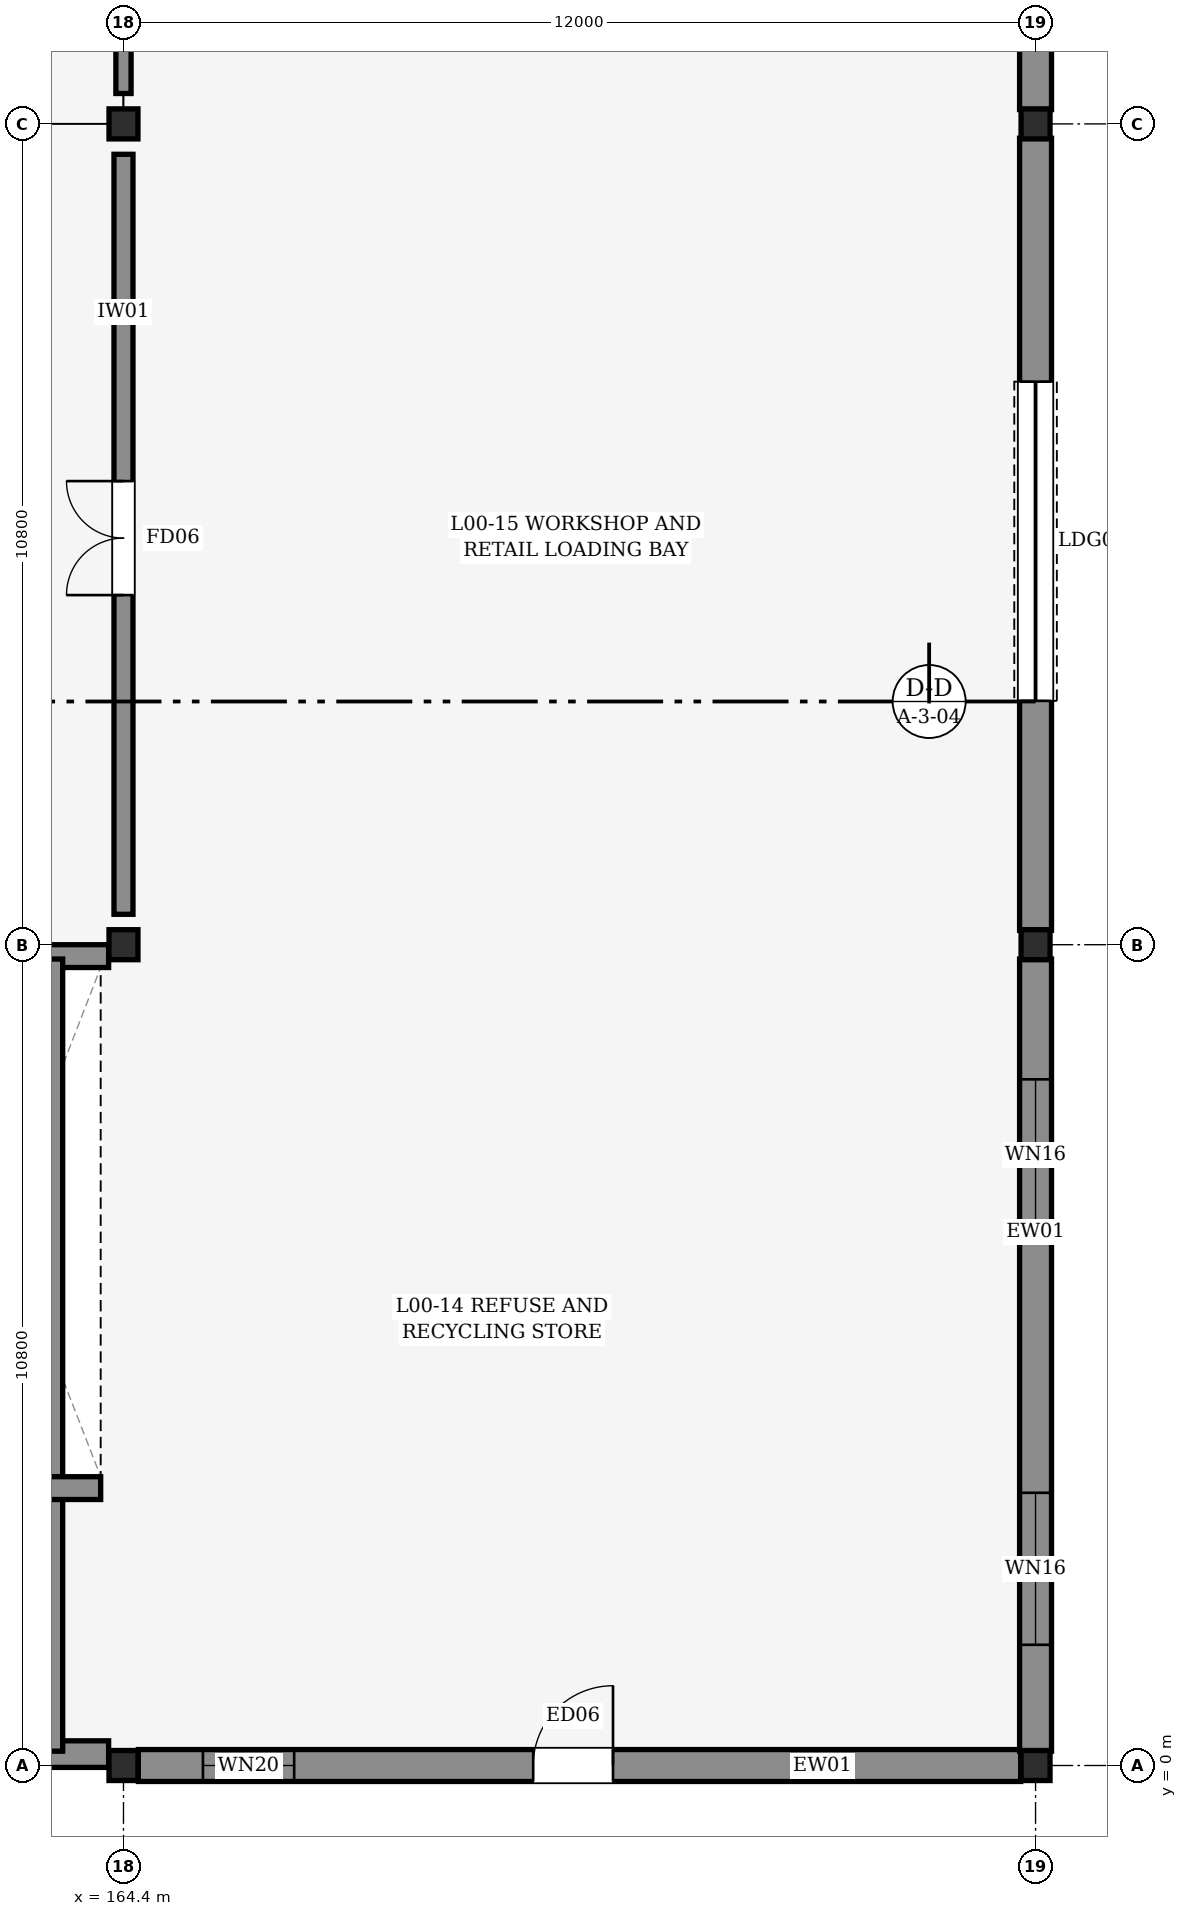
"""IFC4 building model, lengths in metres.
Left out: names, types, materials, properties, quantities, classifications, styles, units other than length and angle.
Written with IfcOpenShell. Run it as: python <this file> out.ifc"""

import sys

from ifc_helpers import new_model, si_unit, direction, frame, frame_2d, origin, origin_2d, place, context, subcontext, project, spatial, rectangle, i_section, extrude, element, fill, save


model = new_model("IFC4")
c1 = context("Model", 3, precision=1e-05, world=origin(), true_north=direction((0.0, 1.0)))
c2 = subcontext(c1, "Body", "Model", "MODEL_VIEW")
j1 = project(units=[si_unit("LENGTHUNIT", "METRE"), si_unit("PLANEANGLEUNIT", "RADIAN")], contexts=[c1])
p1 = place(None, origin())
s1 = spatial("IfcSite", under=j1, at=p1, CompositionType="ELEMENT")
p2 = place(p1, origin())
s2 = spatial("IfcBuilding", under=s1, at=p2, CompositionType="ELEMENT")
p3 = place(p2, origin())
s3 = spatial("IfcBuildingStorey", under=s2, at=p3, CompositionType="ELEMENT", Elevation=0.0)
for number, where, z_axis, x_axis in (
    (1, (164.4, 0.0, 0.0), (0.0, 0.0, 1.0), (1.0, 0.0, 0.0)),
    (2, (164.4, 10.8, 0.0), (0.0, 0.0, 1.0), (1.0, 0.0, 0.0)),
    (3, (164.4, 21.6, 0.0), (0.0, 0.0, 1.0), (1.0, 0.0, 0.0)),
    (4, (176.4, 0.0, 0.0), (0.0, 0.0, 1.0), (1.0, 0.0, 0.0)),
    (5, (176.4, 10.8, 0.0), (0.0, 0.0, 1.0), (1.0, 0.0, 0.0)),
    (6, (176.4, 21.6, 0.0), (0.0, 0.0, 1.0), (1.0, 0.0, 0.0)),
):
    element("IfcColumn", number, at=place(p3, frame(where, z_axis=z_axis, x_axis=x_axis)), inside=s3, PredefinedType="COLUMN", context=c2, shape_type="SweptSolid", body=[
        extrude(i_section(OverallWidth=0.395, OverallDepth=0.381, WebThickness=0.018, FlangeThickness=0.03, FilletRadius=0.015, at=origin_2d()), origin(), (0.0, 0.0, 1.0), 5.4),
    ])
p4 = place(p3, frame((164.595, 0.0, 0.0), z_axis=(0.0, 0.0, 1.0), x_axis=(1.0, 0.0, 0.0)))
e7 = element("IfcWall", 7, at=p4, inside=s3, PredefinedType="STANDARD", context=c2, shape_type="SweptSolid", body=[
    extrude(rectangle(XDim=11.609, YDim=0.42, at=frame_2d((5.805, 0.0))), origin(), (0.0, 0.0, 1.0), 4.335),
])
p5 = place(p4, frame((5.195, 0.0, 0.0)))
e8 = element("IfcOpeningElement", 8, at=p5, cuts=e7, PredefinedType="OPENING", context=c2, shape_type="SweptSolid", body=[
    extrude(rectangle(XDim=1.05, YDim=2.1, at=frame_2d((0.525, 1.05))), frame((0.0, 0.22, 0.0), z_axis=(0.0, -1.0, 0.0), x_axis=(1.0, 0.0, 0.0)), (0.0, 0.0, 1.0), 0.44),
])
p6 = place(p4, frame((0.85, 0.0, 0.75)))
e9 = element("IfcOpeningElement", 9, at=p6, cuts=e7, PredefinedType="OPENING", context=c2, shape_type="SweptSolid", body=[
    extrude(rectangle(XDim=1.2, YDim=1.2, at=frame_2d((0.6, 0.6))), frame((0.0, 0.22, 0.0), z_axis=(0.0, -1.0, 0.0), x_axis=(1.0, 0.0, 0.0)), (0.0, 0.0, 1.0), 0.44),
])
p7 = place(p3, frame((176.4, 0.188, 0.0), z_axis=(0.0, 0.0, 1.0), x_axis=(0.0, 1.0, 0.0)))
e10 = element("IfcWall", 10, at=p7, inside=s3, PredefinedType="STANDARD", context=c2, shape_type="SweptSolid", body=[
    extrude(rectangle(XDim=10.423, YDim=0.42, at=frame_2d((5.211, 0.0))), origin(), (0.0, 0.0, 1.0), 4.335),
])
p8 = place(p7, frame((1.4, 0.0, 0.75)))
e11 = element("IfcOpeningElement", 11, at=p8, cuts=e10, PredefinedType="OPENING", context=c2, shape_type="SweptSolid", body=[
    extrude(rectangle(XDim=2.0, YDim=1.4, at=frame_2d((1.0, 0.7))), frame((0.0, 0.22, 0.0), z_axis=(0.0, -1.0, 0.0), x_axis=(1.0, 0.0, 0.0)), (0.0, 0.0, 1.0), 0.44),
])
p9 = place(p7, frame((6.84, 0.0, 0.75)))
e12 = element("IfcOpeningElement", 12, at=p9, cuts=e10, PredefinedType="OPENING", context=c2, shape_type="SweptSolid", body=[
    extrude(rectangle(XDim=2.0, YDim=1.4, at=frame_2d((1.0, 0.7))), frame((0.0, 0.22, 0.0), z_axis=(0.0, -1.0, 0.0), x_axis=(1.0, 0.0, 0.0)), (0.0, 0.0, 1.0), 0.44),
])
p10 = place(p3, frame((176.4, 10.989, 0.0), z_axis=(0.0, 0.0, 1.0), x_axis=(0.0, 1.0, 0.0)))
e13 = element("IfcWall", 13, at=p10, inside=s3, PredefinedType="STANDARD", context=c2, shape_type="SweptSolid", body=[
    extrude(rectangle(XDim=10.423, YDim=0.42, at=frame_2d((5.211, 0.0))), origin(), (0.0, 0.0, 1.0), 4.335),
])
p11 = place(p10, frame((3.02, 0.0, 0.0)))
e14 = element("IfcOpeningElement", 14, at=p11, cuts=e13, PredefinedType="OPENING", context=c2, shape_type="SweptSolid", body=[
    extrude(rectangle(XDim=4.2, YDim=3.4, at=frame_2d((2.1, 1.7))), frame((0.0, 0.22, 0.0), z_axis=(0.0, -1.0, 0.0), x_axis=(1.0, 0.0, 0.0)), (0.0, 0.0, 1.0), 0.44),
])
p12 = place(p3, frame((176.4, 21.789, 0.0), z_axis=(0.0, 0.0, 1.0), x_axis=(0.0, 1.0, 0.0)))
e15 = element("IfcWall", 15, at=p12, inside=s3, PredefinedType="STANDARD", context=c2, shape_type="SweptSolid", body=[
    extrude(rectangle(XDim=16.429, YDim=0.42, at=frame_2d((8.215, 0.0))), origin(), (0.0, 0.0, 1.0), 4.335),
])
p13 = place(p12, frame((7.22, 0.0, 0.0)))
e16 = element("IfcOpeningElement", 16, at=p13, cuts=e15, PredefinedType="OPENING", context=c2, shape_type="SweptSolid", body=[
    extrude(rectangle(XDim=1.8, YDim=2.5, at=frame_2d((0.9, 1.25))), frame((0.0, 0.22, 0.0), z_axis=(0.0, -1.0, 0.0), x_axis=(1.0, 0.0, 0.0)), (0.0, 0.0, 1.0), 0.44),
])
p14 = place(p12, frame((0.85, 0.0, 0.75)))
e17 = element("IfcOpeningElement", 17, at=p14, cuts=e15, PredefinedType="OPENING", context=c2, shape_type="SweptSolid", body=[
    extrude(rectangle(XDim=2.4, YDim=2.4, at=frame_2d((1.2, 1.2))), frame((0.0, 0.22, 0.0), z_axis=(0.0, -1.0, 0.0), x_axis=(1.0, 0.0, 0.0)), (0.0, 0.0, 1.0), 0.44),
])
p15 = place(p3, frame((152.595, 0.15, 0.0), z_axis=(0.0, 0.0, 1.0), x_axis=(1.0, 0.0, 0.0)))
e18 = element("IfcWall", 18, at=p15, inside=s3, PredefinedType="SHEAR", context=c2, shape_type="SweptSolid", body=[
    extrude(rectangle(XDim=11.609, YDim=0.35, at=frame_2d((5.805, 0.0))), origin(), (0.0, 0.0, 1.0), 5.18),
])
p16 = place(p15, frame((0.534, 0.0, 0.0)))
e19 = element("IfcOpeningElement", 19, at=p16, cuts=e18, PredefinedType="OPENING", context=c2, shape_type="SweptSolid", body=[
    extrude(rectangle(XDim=1.8, YDim=2.24, at=frame_2d((0.9, 1.12))), frame((0.0, 0.185, 0.0), z_axis=(0.0, -1.0, 0.0), x_axis=(1.0, 0.0, 0.0)), (0.0, 0.0, 1.0), 0.37),
])
p17 = place(p3, frame((152.595, 10.65, 0.0), z_axis=(0.0, 0.0, 1.0), x_axis=(1.0, 0.0, 0.0)))
e20 = element("IfcWall", 20, at=p17, inside=s3, PredefinedType="SHEAR", context=c2, shape_type="SweptSolid", body=[
    extrude(rectangle(XDim=11.609, YDim=0.3, at=frame_2d((5.805, 0.0))), origin(), (0.0, 0.0, 1.0), 5.18),
])
p18 = place(p17, frame((2.385, 0.0, 0.0)))
e21 = element("IfcOpeningElement", 21, at=p18, cuts=e20, PredefinedType="OPENING", context=c2, shape_type="SweptSolid", body=[
    extrude(rectangle(XDim=1.25, YDim=2.15, at=frame_2d((0.625, 1.075))), frame((0.0, 0.16, 0.0), z_axis=(0.0, -1.0, 0.0), x_axis=(1.0, 0.0, 0.0)), (0.0, 0.0, 1.0), 0.32),
])
p19 = place(p3, frame((163.45, 0.188, 0.0), z_axis=(0.0, 0.0, 1.0), x_axis=(0.0, 1.0, 0.0)))
e22 = element("IfcWall", 22, at=p19, inside=s3, PredefinedType="SHEAR", context=c2, shape_type="SweptSolid", body=[
    extrude(rectangle(XDim=10.423, YDim=0.3, at=frame_2d((5.211, 0.0))), origin(), (0.0, 0.0, 1.0), 5.18),
])
p20 = place(p3, frame((152.7, 3.65, 0.0), z_axis=(0.0, 0.0, 1.0), x_axis=(1.0, 0.0, 0.0)))
e23 = element("IfcWall", 23, at=p20, inside=s3, PredefinedType="SHEAR", context=c2, shape_type="SweptSolid", body=[
    extrude(rectangle(XDim=11.4, YDim=0.3, at=frame_2d((5.7, 0.0))), origin(), (0.0, 0.0, 1.0), 5.18),
])
p21 = place(p20, frame((0.55, 0.0, 0.0)))
e24 = element("IfcOpeningElement", 24, at=p21, cuts=e23, PredefinedType="OPENING", context=c2, shape_type="SweptSolid", body=[
    extrude(rectangle(XDim=1.15, YDim=2.15, at=frame_2d((0.575, 1.075))), frame((0.0, 0.16, 0.0), z_axis=(0.0, -1.0, 0.0), x_axis=(1.0, 0.0, 0.0)), (0.0, 0.0, 1.0), 0.32),
])
p22 = place(p3, frame((164.4, 11.2, 0.0), z_axis=(0.0, 0.0, 1.0), x_axis=(0.0, 1.0, 0.0)))
e25 = element("IfcWall", 25, at=p22, inside=s3, PredefinedType="PARTITIONING", context=c2, shape_type="SweptSolid", body=[
    extrude(rectangle(XDim=10.0, YDim=0.25, at=frame_2d((5.0, 0.0))), origin(), (0.0, 0.0, 1.0), 4.325),
])
p23 = place(p22, frame((4.2, 0.0, 0.0)))
e26 = element("IfcOpeningElement", 26, at=p23, cuts=e25, PredefinedType="OPENING", context=c2, shape_type="SweptSolid", body=[
    extrude(rectangle(XDim=1.5, YDim=2.25, at=frame_2d((0.75, 1.125))), frame((0.0, 0.135, 0.0), z_axis=(0.0, -1.0, 0.0), x_axis=(1.0, 0.0, 0.0)), (0.0, 0.0, 1.0), 0.27),
])
p24 = place(p3, frame((164.4, 22.0, 0.0), z_axis=(0.0, 0.0, 1.0), x_axis=(0.0, 1.0, 0.0)))
e27 = element("IfcWall", 27, at=p24, inside=s3, PredefinedType="PARTITIONING", context=c2, shape_type="SweptSolid", body=[
    extrude(rectangle(XDim=41.2, YDim=0.2, at=frame_2d((20.6, 0.0))), origin(), (0.0, 0.0, 1.0), 4.325),
])
p25 = place(p24, frame((6.0, 0.0, 0.0)))
e28 = element("IfcOpeningElement", 28, at=p25, cuts=e27, PredefinedType="OPENING", context=c2, shape_type="SweptSolid", body=[
    extrude(rectangle(XDim=1.6, YDim=2.25, at=frame_2d((0.8, 1.125))), frame((0.0, 0.11, 0.0), z_axis=(0.0, -1.0, 0.0), x_axis=(1.0, 0.0, 0.0)), (0.0, 0.0, 1.0), 0.22),
])
p26 = place(p5, frame((1.05, 0.0, 0.0), z_axis=(0.0, 0.0, 1.0), x_axis=(-1.0, 0.0, 0.0)))
e29 = element("IfcDoor", 29, at=p26, inside=s3, OperationType="SINGLE_SWING_LEFT", PredefinedType="DOOR", context=c2, shape_type="SweptSolid", body=[
    extrude(rectangle(XDim=1.05, YDim=2.1, at=frame_2d((0.525, 1.05))), frame((0.0, 0.025, 0.0), z_axis=(0.0, -1.0, 0.0), x_axis=(1.0, 0.0, 0.0)), (0.0, 0.0, 1.0), 0.05),
])
fill(e8, e29)
p27 = place(p6, origin())
e30 = element("IfcWindow", 30, at=p27, inside=s3, PartitioningType="SINGLE_PANEL", PredefinedType="WINDOW", context=c2, shape_type="SweptSolid", body=[
    extrude(rectangle(XDim=1.2, YDim=1.2, at=frame_2d((0.6, 0.6))), frame((0.0, 0.03, 0.0), z_axis=(0.0, -1.0, 0.0), x_axis=(1.0, 0.0, 0.0)), (0.0, 0.0, 1.0), 0.06),
])
fill(e9, e30)
p28 = place(p8, origin())
e31 = element("IfcWindow", 31, at=p28, inside=s3, PartitioningType="SINGLE_PANEL", PredefinedType="WINDOW", context=c2, shape_type="SweptSolid", body=[
    extrude(rectangle(XDim=2.0, YDim=1.4, at=frame_2d((1.0, 0.7))), frame((0.0, 0.03, 0.0), z_axis=(0.0, -1.0, 0.0), x_axis=(1.0, 0.0, 0.0)), (0.0, 0.0, 1.0), 0.06),
])
fill(e11, e31)
p29 = place(p9, origin())
e32 = element("IfcWindow", 32, at=p29, inside=s3, PartitioningType="SINGLE_PANEL", PredefinedType="WINDOW", context=c2, shape_type="SweptSolid", body=[
    extrude(rectangle(XDim=2.0, YDim=1.4, at=frame_2d((1.0, 0.7))), frame((0.0, 0.03, 0.0), z_axis=(0.0, -1.0, 0.0), x_axis=(1.0, 0.0, 0.0)), (0.0, 0.0, 1.0), 0.06),
])
fill(e12, e32)
p30 = place(p11, frame((4.2, 0.0, 0.0), z_axis=(0.0, 0.0, 1.0), x_axis=(-1.0, 0.0, 0.0)))
e33 = element("IfcDoor", 33, at=p30, inside=s3, OperationType="ROLLINGUP", PredefinedType="DOOR", context=c2, shape_type="SweptSolid", body=[
    extrude(rectangle(XDim=4.2, YDim=3.4, at=frame_2d((2.1, 1.7))), frame((0.0, 0.025, 0.0), z_axis=(0.0, -1.0, 0.0), x_axis=(1.0, 0.0, 0.0)), (0.0, 0.0, 1.0), 0.05),
])
fill(e14, e33)
p31 = place(p23, origin())
e34 = element("IfcDoor", 34, at=p31, inside=s3, OperationType="DOUBLE_DOOR_SINGLE_SWING", PredefinedType="DOOR", context=c2, shape_type="SweptSolid", body=[
    extrude(rectangle(XDim=1.5, YDim=2.25, at=frame_2d((0.75, 1.125))), frame((0.0, 0.025, 0.0), z_axis=(0.0, -1.0, 0.0), x_axis=(1.0, 0.0, 0.0)), (0.0, 0.0, 1.0), 0.05),
])
fill(e26, e34)
save(model, sys.argv[1])
